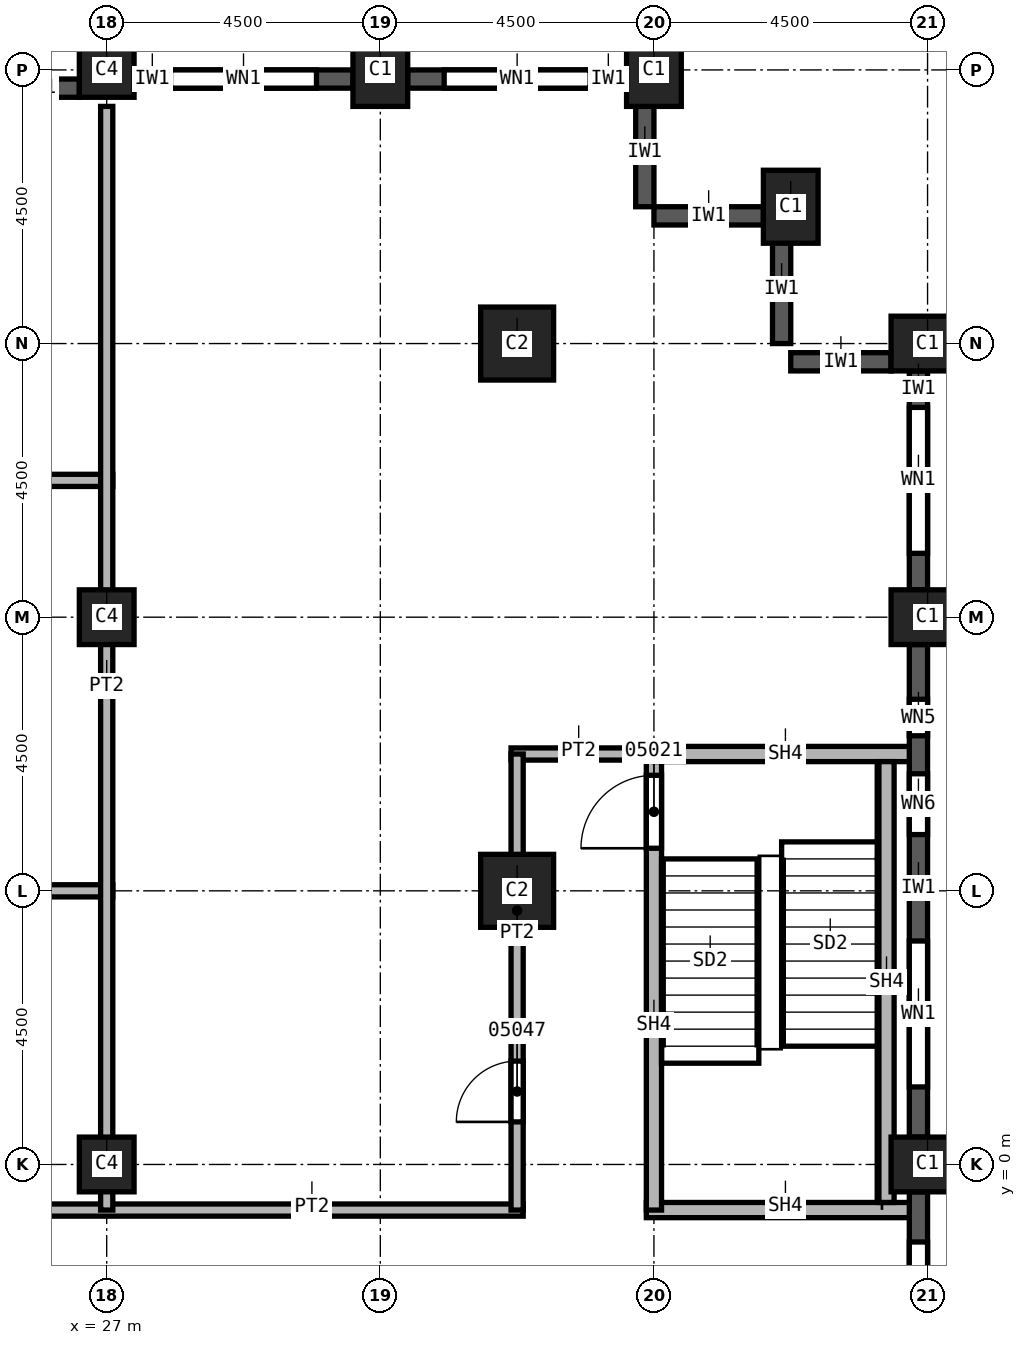
"""IFC4 building model, lengths in metres.
Left out: names, types, materials, properties, quantities, classifications, styles, units other than length and angle.
Written with IfcOpenShell. Run it as: python <this file> out.ifc"""

import sys

from ifc_helpers import new_model, si_unit, direction, frame, frame_2d, origin, origin_2d, place, context, subcontext, project, spatial, rectangle, extrude, element, fill, save


model = new_model("IFC4")
c1 = context("Model", 3, precision=1e-05, world=origin(), true_north=direction((0.0, 1.0)))
c2 = subcontext(c1, "Body", "Model", "MODEL_VIEW")
j1 = project(units=[si_unit("LENGTHUNIT", "METRE"), si_unit("PLANEANGLEUNIT", "RADIAN")], contexts=[c1])
p1 = place(None, origin())
s1 = spatial("IfcSite", under=j1, at=p1, CompositionType="ELEMENT")
p2 = place(p1, origin())
s2 = spatial("IfcBuilding", under=s1, at=p2, CompositionType="ELEMENT")
p3 = place(p2, frame((0.0, 0.0, 116.0)))
s3 = spatial("IfcBuildingStorey", under=s2, at=p3, CompositionType="ELEMENT", Elevation=116.0)
for number, where, z_axis, x_axis in (
    (1, (40.5, 0.0, 0.0), (0.0, 0.0, 1.0), (0.0, 1.0, 0.0)),
    (2, (40.5, 9.0, 0.0), (0.0, 0.0, 1.0), (0.0, 1.0, 0.0)),
    (3, (40.5, 13.5, 0.0), (0.0, 0.0, 1.0), (0.0, 1.0, 0.0)),
    (4, (38.25, 15.75, 0.0), (0.0, 0.0, 1.0), (1.0, 0.0, 0.0)),
    (5, (31.5, 18.0, 0.0), (0.0, 0.0, 1.0), (1.0, 0.0, 0.0)),
    (6, (36.0, 18.0, 0.0), (0.0, 0.0, 1.0), (1.0, 0.0, 0.0)),
):
    element("IfcColumn", number, at=place(p3, frame(where, z_axis=z_axis, x_axis=x_axis)), inside=s3, PredefinedType="COLUMN", context=c2, shape_type="SweptSolid", body=[
        extrude(rectangle(XDim=0.9, YDim=1.2, at=origin_2d()), origin(), (0.0, 0.0, 1.0), 3.6),
    ])
for number, where, z_axis, x_axis in (
    (7, (33.75, 4.5, 0.0), (0.0, 0.0, 1.0), (1.0, 0.0, 0.0)),
    (8, (33.75, 13.5, 0.0), (0.0, 0.0, 1.0), (1.0, 0.0, 0.0)),
):
    element("IfcColumn", number, at=place(p3, frame(where, z_axis=z_axis, x_axis=x_axis)), inside=s3, PredefinedType="COLUMN", context=c2, shape_type="SweptSolid", body=[
        extrude(rectangle(XDim=1.2, YDim=1.2, at=origin_2d()), origin(), (0.0, 0.0, 1.0), 3.6),
    ])
for number, where, z_axis, x_axis in (
    (9, (27.0, 0.0, 0.0), (0.0, 0.0, 1.0), (1.0, 0.0, 0.0)),
    (10, (27.0, 9.0, 0.0), (0.0, 0.0, 1.0), (1.0, 0.0, 0.0)),
    (11, (27.0, 18.0, 0.0), (0.0, 0.0, 1.0), (1.0, 0.0, 0.0)),
):
    element("IfcColumn", number, at=place(p3, frame(where, z_axis=z_axis, x_axis=x_axis)), inside=s3, PredefinedType="COLUMN", context=c2, shape_type="SweptSolid", body=[
        extrude(rectangle(XDim=0.9, YDim=0.9, at=origin_2d()), origin(), (0.0, 0.0, 1.0), 3.6),
    ])
p4 = place(p3, frame((39.9, 13.2, 0.0), z_axis=(0.0, 0.0, 1.0), x_axis=(-1.0, 0.0, 0.0)))
e12 = element("IfcWall", 12, at=p4, inside=s3, PredefinedType="SOLIDWALL", context=c2, shape_type="SweptSolid", body=[
    extrude(rectangle(XDim=1.65, YDim=0.3, at=frame_2d((0.825, 0.0))), origin(), (0.0, 0.0, 1.0), 3.0),
])
for number, where, z_axis, x_axis in (
    (13, (38.1, 15.3, 0.0), (0.0, 0.0, 1.0), (0.0, -1.0, 0.0)),
    (14, (37.8, 15.6, 0.0), (0.0, 0.0, 1.0), (-1.0, 0.0, 0.0)),
    (15, (35.85, 17.55, 0.0), (0.0, 0.0, 1.0), (0.0, -1.0, 0.0)),
):
    element("IfcWall", number, at=place(p3, frame(where, z_axis=z_axis, x_axis=x_axis)), inside=s3, PredefinedType="SOLIDWALL", context=c2, shape_type="SweptSolid", body=[
        extrude(rectangle(XDim=1.8, YDim=0.3, at=frame_2d((0.9, 0.0))), origin(), (0.0, 0.0, 1.0), 3.0),
    ])
p5 = place(p3, frame((40.35, -8.55, 0.0), z_axis=(0.0, 0.0, 1.0), x_axis=(0.0, 1.0, 0.0)))
e16 = element("IfcWall", 16, at=p5, inside=s3, PredefinedType="SOLIDWALL", context=c2, shape_type="SweptSolid", body=[
    extrude(rectangle(XDim=8.1, YDim=0.3, at=frame_2d((4.05, 0.0))), origin(), (0.0, 0.0, 1.0), 3.0),
])
p6 = place(p5, frame((0.825, 0.0, 0.8)))
e17 = element("IfcOpeningElement", 17, at=p6, cuts=e16, PredefinedType="OPENING", context=c2, shape_type="SweptSolid", body=[
    extrude(rectangle(XDim=2.4, YDim=1.95, at=frame_2d((1.2, 0.975))), frame((0.0, 0.15, 0.0), z_axis=(0.0, -1.0, 0.0), x_axis=(1.0, 0.0, 0.0)), (0.0, 0.0, 1.0), 0.3),
])
p7 = place(p5, frame((4.875, 0.0, 0.8)))
e18 = element("IfcOpeningElement", 18, at=p7, cuts=e16, PredefinedType="OPENING", context=c2, shape_type="SweptSolid", body=[
    extrude(rectangle(XDim=2.4, YDim=1.95, at=frame_2d((1.2, 0.975))), frame((0.0, 0.15, 0.0), z_axis=(0.0, -1.0, 0.0), x_axis=(1.0, 0.0, 0.0)), (0.0, 0.0, 1.0), 0.3),
])
p8 = place(p3, frame((40.35, 0.45, 0.0), z_axis=(0.0, 0.0, 1.0), x_axis=(0.0, 1.0, 0.0)))
e19 = element("IfcWall", 19, at=p8, inside=s3, PredefinedType="SOLIDWALL", context=c2, shape_type="SweptSolid", body=[
    extrude(rectangle(XDim=8.1, YDim=0.3, at=frame_2d((4.05, 0.0))), origin(), (0.0, 0.0, 1.0), 3.0),
])
p9 = place(p8, frame((0.825, 0.0, 0.8)))
e20 = element("IfcOpeningElement", 20, at=p9, cuts=e19, PredefinedType="OPENING", context=c2, shape_type="SweptSolid", body=[
    extrude(rectangle(XDim=2.4, YDim=1.95, at=frame_2d((1.2, 0.975))), frame((0.0, 0.15, 0.0), z_axis=(0.0, -1.0, 0.0), x_axis=(1.0, 0.0, 0.0)), (0.0, 0.0, 1.0), 0.3),
])
p10 = place(p8, frame((4.975, 0.0, 0.8)))
e21 = element("IfcOpeningElement", 21, at=p10, cuts=e19, PredefinedType="OPENING", context=c2, shape_type="SweptSolid", body=[
    extrude(rectangle(XDim=1.0, YDim=1.95, at=frame_2d((0.5, 0.975))), frame((0.0, 0.15, 0.0), z_axis=(0.0, -1.0, 0.0), x_axis=(1.0, 0.0, 0.0)), (0.0, 0.0, 1.0), 0.3),
])
p11 = place(p8, frame((6.6, 0.0, 0.8)))
e22 = element("IfcOpeningElement", 22, at=p11, cuts=e19, PredefinedType="OPENING", context=c2, shape_type="SweptSolid", body=[
    extrude(rectangle(XDim=0.6, YDim=1.95, at=frame_2d((0.3, 0.975))), frame((0.0, 0.15, 0.0), z_axis=(0.0, -1.0, 0.0), x_axis=(1.0, 0.0, 0.0)), (0.0, 0.0, 1.0), 0.3),
])
p12 = place(p3, frame((40.35, 9.45, 0.0), z_axis=(0.0, 0.0, 1.0), x_axis=(0.0, 1.0, 0.0)))
e23 = element("IfcWall", 23, at=p12, inside=s3, PredefinedType="SOLIDWALL", context=c2, shape_type="SweptSolid", body=[
    extrude(rectangle(XDim=3.6, YDim=0.3, at=frame_2d((1.8, 0.0))), origin(), (0.0, 0.0, 1.0), 3.0),
])
p13 = place(p12, frame((0.6, 0.0, 0.8)))
e24 = element("IfcOpeningElement", 24, at=p13, cuts=e23, PredefinedType="OPENING", context=c2, shape_type="SweptSolid", body=[
    extrude(rectangle(XDim=2.4, YDim=1.95, at=frame_2d((1.2, 0.975))), frame((0.0, 0.15, 0.0), z_axis=(0.0, -1.0, 0.0), x_axis=(1.0, 0.0, 0.0)), (0.0, 0.0, 1.0), 0.3),
])
p14 = place(p3, frame((35.55, 17.85, 0.0), z_axis=(0.0, 0.0, 1.0), x_axis=(-1.0, 0.0, 0.0)))
e25 = element("IfcWall", 25, at=p14, inside=s3, PredefinedType="SOLIDWALL", context=c2, shape_type="SweptSolid", body=[
    extrude(rectangle(XDim=3.6, YDim=0.3, at=frame_2d((1.8, 0.0))), origin(), (0.0, 0.0, 1.0), 3.0),
])
p15 = place(p14, frame((0.6, 0.0, 0.8)))
e26 = element("IfcOpeningElement", 26, at=p15, cuts=e25, PredefinedType="OPENING", context=c2, shape_type="SweptSolid", body=[
    extrude(rectangle(XDim=2.4, YDim=1.95, at=frame_2d((1.2, 0.975))), frame((0.0, 0.15, 0.0), z_axis=(0.0, -1.0, 0.0), x_axis=(1.0, 0.0, 0.0)), (0.0, 0.0, 1.0), 0.3),
])
p16 = place(p3, frame((31.05, 17.85, 0.0), z_axis=(0.0, 0.0, 1.0), x_axis=(-1.0, 0.0, 0.0)))
e27 = element("IfcWall", 27, at=p16, inside=s3, PredefinedType="SOLIDWALL", context=c2, shape_type="SweptSolid", body=[
    extrude(rectangle(XDim=3.6, YDim=0.3, at=frame_2d((1.8, 0.0))), origin(), (0.0, 0.0, 1.0), 3.0),
])
p17 = place(p16, frame((0.6, 0.0, 0.8)))
e28 = element("IfcOpeningElement", 28, at=p17, cuts=e27, PredefinedType="OPENING", context=c2, shape_type="SweptSolid", body=[
    extrude(rectangle(XDim=2.4, YDim=1.95, at=frame_2d((1.2, 0.975))), frame((0.0, 0.15, 0.0), z_axis=(0.0, -1.0, 0.0), x_axis=(1.0, 0.0, 0.0)), (0.0, 0.0, 1.0), 0.3),
])
p18 = place(p3, frame((26.55, 17.7, 0.0), z_axis=(0.0, 0.0, 1.0), x_axis=(-1.0, 0.0, 0.0)))
e29 = element("IfcWall", 29, at=p18, inside=s3, PredefinedType="SOLIDWALL", context=c2, shape_type="SweptSolid", body=[
    extrude(rectangle(XDim=1.35, YDim=0.3, at=frame_2d((0.675, 0.0))), origin(), (0.0, 0.0, 1.0), 3.0),
])
p19 = place(p3, frame((19.9, -0.75, 0.0), z_axis=(0.0, 0.0, 1.0), x_axis=(1.0, 0.0, 0.0)))
e30 = element("IfcWall", 30, at=p19, inside=s3, PredefinedType="PARTITIONING", context=c2, shape_type="SweptSolid", body=[
    extrude(rectangle(XDim=13.95, YDim=0.2, at=frame_2d((6.975, 0.0))), origin(), (0.0, 0.0, 1.0), 3.6),
])
p20 = place(p19, frame((3.4, 0.0, 0.0)))
e31 = element("IfcOpeningElement", 31, at=p20, cuts=e30, PredefinedType="OPENING", context=c2, shape_type="SweptSolid", body=[
    extrude(rectangle(XDim=1.0, YDim=2.1, at=frame_2d((0.5, 1.05))), frame((0.0, 0.1, 0.0), z_axis=(0.0, -1.0, 0.0), x_axis=(1.0, 0.0, 0.0)), (0.0, 0.0, 1.0), 0.2),
])
for number, where, z_axis, x_axis in (
    (32, (19.9, 4.5, 0.0), (0.0, 0.0, 1.0), (1.0, 0.0, 0.0)),
    (33, (19.9, 11.25, 0.0), (0.0, 0.0, 1.0), (1.0, 0.0, 0.0)),
):
    element("IfcWall", number, at=place(p3, frame(where, z_axis=z_axis, x_axis=x_axis)), inside=s3, PredefinedType="PARTITIONING", context=c2, shape_type="SweptSolid", body=[
        extrude(rectangle(XDim=7.2, YDim=0.2, at=frame_2d((3.6, 0.0))), origin(), (0.0, 0.0, 1.0), 3.6),
    ])
p21 = place(p3, frame((27.0, 17.4, 0.0), z_axis=(0.0, 0.0, 1.0), x_axis=(0.0, -1.0, 0.0)))
e34 = element("IfcWall", 34, at=p21, inside=s3, PredefinedType="PARTITIONING", context=c2, shape_type="SweptSolid", body=[
    extrude(rectangle(XDim=18.15, YDim=0.2, at=frame_2d((9.075, 0.0))), origin(), (0.0, 0.0, 1.0), 3.6),
])
p22 = place(p3, frame((33.65, 6.75, 0.0), z_axis=(0.0, 0.0, 1.0), x_axis=(1.0, 0.0, 0.0)))
e35 = element("IfcWall", 35, at=p22, inside=s3, PredefinedType="PARTITIONING", context=c2, shape_type="SweptSolid", body=[
    extrude(rectangle(XDim=2.35, YDim=0.2, at=frame_2d((1.175, 0.0))), origin(), (0.0, 0.0, 1.0), 3.6),
])
p23 = place(p3, frame((33.75, -0.75, 0.0), z_axis=(0.0, 0.0, 1.0), x_axis=(0.0, 1.0, 0.0)))
e36 = element("IfcWall", 36, at=p23, inside=s3, PredefinedType="PARTITIONING", context=c2, shape_type="SweptSolid", body=[
    extrude(rectangle(XDim=7.5, YDim=0.2, at=frame_2d((3.75, 0.0))), origin(), (0.0, 0.0, 1.0), 3.6),
])
p24 = place(p23, frame((1.45, 0.0, 0.0)))
e37 = element("IfcOpeningElement", 37, at=p24, cuts=e36, PredefinedType="OPENING", context=c2, shape_type="SweptSolid", body=[
    extrude(rectangle(XDim=1.0, YDim=2.1, at=frame_2d((0.5, 1.05))), frame((0.0, 0.1, 0.0), z_axis=(0.0, -1.0, 0.0), x_axis=(1.0, 0.0, 0.0)), (0.0, 0.0, 1.0), 0.2),
])
p25 = place(p3, frame((35.875, -0.75, 0.0), z_axis=(0.0, 0.0, 1.0), x_axis=(1.0, 0.0, 0.0)))
e38 = element("IfcWall", 38, at=p25, inside=s3, PredefinedType="SOLIDWALL", context=c2, shape_type="SweptSolid", body=[
    extrude(rectangle(XDim=4.325, YDim=0.25, at=frame_2d((2.163, 0.0))), origin(), (0.0, 0.0, 1.0), 3.6),
])
p26 = place(p3, frame((36.0, -0.75, 0.0), z_axis=(0.0, 0.0, 1.0), x_axis=(0.0, 1.0, 0.0)))
e39 = element("IfcWall", 39, at=p26, inside=s3, PredefinedType="SOLIDWALL", context=c2, shape_type="SweptSolid", body=[
    extrude(rectangle(XDim=7.625, YDim=0.25, at=frame_2d((3.812, 0.0))), origin(), (0.0, 0.0, 1.0), 3.6),
])
p27 = place(p26, frame((5.95, 0.0, 0.0)))
e40 = element("IfcOpeningElement", 40, at=p27, cuts=e39, PredefinedType="OPENING", context=c2, shape_type="SweptSolid", body=[
    extrude(rectangle(XDim=1.2, YDim=2.1, at=frame_2d((0.6, 1.05))), frame((0.0, 0.125, 0.0), z_axis=(0.0, -1.0, 0.0), x_axis=(1.0, 0.0, 0.0)), (0.0, 0.0, 1.0), 0.25),
])
p28 = place(p3, frame((36.0, 6.75, 0.0), z_axis=(0.0, 0.0, 1.0), x_axis=(1.0, 0.0, 0.0)))
e41 = element("IfcWall", 41, at=p28, inside=s3, PredefinedType="SOLIDWALL", context=c2, shape_type="SweptSolid", body=[
    extrude(rectangle(XDim=4.2, YDim=0.25, at=frame_2d((2.1, 0.0))), origin(), (0.0, 0.0, 1.0), 3.6),
])
p29 = place(p3, frame((39.825, -0.625, 0.0), z_axis=(0.0, 0.0, 1.0), x_axis=(0.0, 1.0, 0.0)))
e42 = element("IfcWall", 42, at=p29, inside=s3, PredefinedType="SOLIDWALL", context=c2, shape_type="SweptSolid", body=[
    extrude(rectangle(XDim=7.25, YDim=0.25, at=frame_2d((3.625, 0.0))), origin(), (0.0, 0.0, 1.0), 3.6),
])
p30 = place(p7, origin())
e43 = element("IfcWindow", 43, at=p30, inside=s3, PartitioningType="SINGLE_PANEL", PredefinedType="WINDOW", context=c2, shape_type="SweptSolid", body=[
    extrude(rectangle(XDim=2.4, YDim=1.95, at=frame_2d((1.2, 0.975))), frame((0.0, 0.03, 0.0), z_axis=(0.0, -1.0, 0.0), x_axis=(1.0, 0.0, 0.0)), (0.0, 0.0, 1.0), 0.06),
])
fill(e18, e43)
p31 = place(p9, origin())
e44 = element("IfcWindow", 44, at=p31, inside=s3, PartitioningType="SINGLE_PANEL", PredefinedType="WINDOW", context=c2, shape_type="SweptSolid", body=[
    extrude(rectangle(XDim=2.4, YDim=1.95, at=frame_2d((1.2, 0.975))), frame((0.0, 0.03, 0.0), z_axis=(0.0, -1.0, 0.0), x_axis=(1.0, 0.0, 0.0)), (0.0, 0.0, 1.0), 0.06),
])
fill(e20, e44)
p32 = place(p13, origin())
e45 = element("IfcWindow", 45, at=p32, inside=s3, PartitioningType="SINGLE_PANEL", PredefinedType="WINDOW", context=c2, shape_type="SweptSolid", body=[
    extrude(rectangle(XDim=2.4, YDim=1.95, at=frame_2d((1.2, 0.975))), frame((0.0, 0.03, 0.0), z_axis=(0.0, -1.0, 0.0), x_axis=(1.0, 0.0, 0.0)), (0.0, 0.0, 1.0), 0.06),
])
fill(e24, e45)
p33 = place(p15, origin())
e46 = element("IfcWindow", 46, at=p33, inside=s3, PartitioningType="SINGLE_PANEL", PredefinedType="WINDOW", context=c2, shape_type="SweptSolid", body=[
    extrude(rectangle(XDim=2.4, YDim=1.95, at=frame_2d((1.2, 0.975))), frame((0.0, 0.03, 0.0), z_axis=(0.0, -1.0, 0.0), x_axis=(1.0, 0.0, 0.0)), (0.0, 0.0, 1.0), 0.06),
])
fill(e26, e46)
p34 = place(p17, origin())
e47 = element("IfcWindow", 47, at=p34, inside=s3, PartitioningType="SINGLE_PANEL", PredefinedType="WINDOW", context=c2, shape_type="SweptSolid", body=[
    extrude(rectangle(XDim=2.4, YDim=1.95, at=frame_2d((1.2, 0.975))), frame((0.0, 0.03, 0.0), z_axis=(0.0, -1.0, 0.0), x_axis=(1.0, 0.0, 0.0)), (0.0, 0.0, 1.0), 0.06),
])
fill(e28, e47)
p35 = place(p27, origin())
e48 = element("IfcDoor", 48, at=p35, inside=s3, OperationType="SINGLE_SWING_RIGHT", PredefinedType="DOOR", context=c2, shape_type="SweptSolid", body=[
    extrude(rectangle(XDim=1.2, YDim=2.1, at=frame_2d((0.6, 1.05))), frame((0.0, 0.025, 0.0), z_axis=(0.0, -1.0, 0.0), x_axis=(1.0, 0.0, 0.0)), (0.0, 0.0, 1.0), 0.05),
])
fill(e40, e48)
p36 = place(p24, origin())
e49 = element("IfcDoor", 49, at=p36, inside=s3, OperationType="SINGLE_SWING_RIGHT", PredefinedType="DOOR", context=c2, shape_type="SweptSolid", body=[
    extrude(rectangle(XDim=1.0, YDim=2.1, at=frame_2d((0.5, 1.05))), frame((0.0, 0.025, 0.0), z_axis=(0.0, -1.0, 0.0), x_axis=(1.0, 0.0, 0.0)), (0.0, 0.0, 1.0), 0.05),
])
fill(e37, e49)
p37 = place(p10, origin())
e50 = element("IfcWindow", 50, at=p37, inside=s3, PartitioningType="SINGLE_PANEL", PredefinedType="WINDOW", context=c2, shape_type="SweptSolid", body=[
    extrude(rectangle(XDim=1.0, YDim=1.95, at=frame_2d((0.5, 0.975))), frame((0.0, 0.03, 0.0), z_axis=(0.0, -1.0, 0.0), x_axis=(1.0, 0.0, 0.0)), (0.0, 0.0, 1.0), 0.06),
])
fill(e21, e50)
p38 = place(p11, origin())
e51 = element("IfcWindow", 51, at=p38, inside=s3, PartitioningType="SINGLE_PANEL", PredefinedType="WINDOW", context=c2, shape_type="SweptSolid", body=[
    extrude(rectangle(XDim=0.6, YDim=1.95, at=frame_2d((0.3, 0.975))), frame((0.0, 0.03, 0.0), z_axis=(0.0, -1.0, 0.0), x_axis=(1.0, 0.0, 0.0)), (0.0, 0.0, 1.0), 0.06),
])
fill(e22, e51)
save(model, sys.argv[1])
